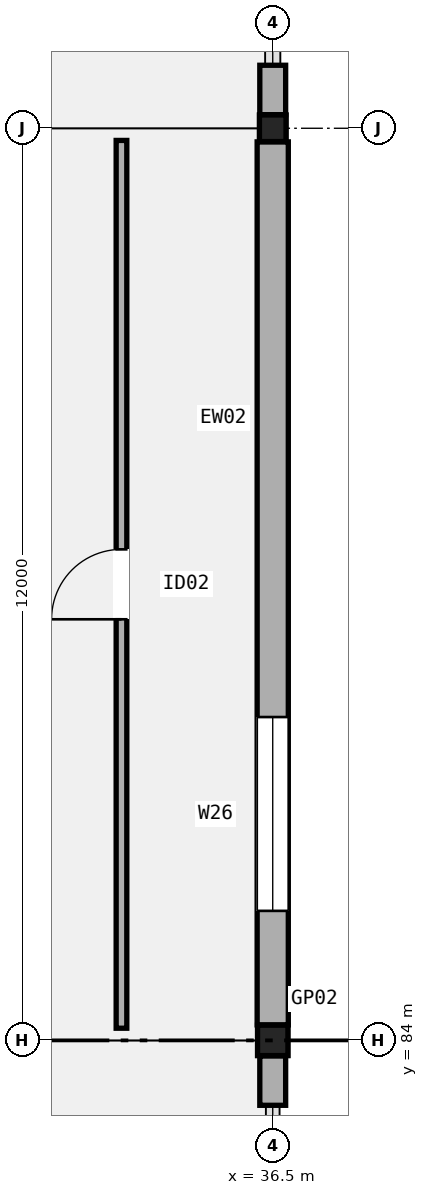
"""IFC4 building model, lengths in metres.
Left out: names, types, materials, properties, quantities, classifications, styles, units other than length and angle.
Written with IfcOpenShell. Run it as: python <this file> out.ifc"""

import sys

from ifc_helpers import new_model, si_unit, direction, frame, frame_2d, origin, origin_2d, place, context, subcontext, project, spatial, rectangle, hollow_rectangle, extrude, element, fill, save


model = new_model("IFC4")
c1 = context("Model", 3, precision=1e-05, world=origin(), true_north=direction((0.0, 1.0)))
c2 = subcontext(c1, "Body", "Model", "MODEL_VIEW")
j1 = project(units=[si_unit("LENGTHUNIT", "METRE"), si_unit("PLANEANGLEUNIT", "RADIAN")], contexts=[c1])
p1 = place(None, origin())
s1 = spatial("IfcSite", under=j1, at=p1, CompositionType="ELEMENT")
p2 = place(p1, origin())
s2 = spatial("IfcBuilding", under=s1, at=p2, CompositionType="ELEMENT")
p3 = place(p2, frame((0.0, 0.0, 15.3)))
s3 = spatial("IfcBuildingStorey", under=s2, at=p3, CompositionType="ELEMENT", Elevation=15.3)
p4 = place(p3, frame((36.5, 84.0, 0.0), z_axis=(0.0, 0.0, 1.0), x_axis=(1.0, 0.0, 0.0)))
e1 = element("IfcColumn", 1, at=p4, inside=s3, PredefinedType="COLUMN", context=c2, shape_type="SweptSolid", body=[
    extrude(hollow_rectangle(XDim=0.4, YDim=0.4, WallThickness=0.016, InnerFilletRadius=0.016, OuterFilletRadius=0.032, at=origin_2d()), origin(), (0.0, 0.0, 1.0), 5.1),
])
p5 = place(p3, frame((36.5, 96.0, 0.0), z_axis=(0.0, 0.0, 1.0), x_axis=(1.0, 0.0, 0.0)))
e2 = element("IfcColumn", 2, at=p5, inside=s3, PredefinedType="COLUMN", context=c2, shape_type="SweptSolid", body=[
    extrude(hollow_rectangle(XDim=0.35, YDim=0.35, WallThickness=0.016, InnerFilletRadius=0.016, OuterFilletRadius=0.032, at=origin_2d()), origin(), (0.0, 0.0, 1.0), 5.1),
])
p6 = place(p3, frame((36.5, 83.146, 0.0), z_axis=(0.0, 0.0, 1.0), x_axis=(0.0, 1.0, 0.0)))
e3 = element("IfcWall", 3, at=p6, inside=s3, PredefinedType="SOLIDWALL", context=c2, shape_type="SweptSolid", body=[
    extrude(rectangle(XDim=0.65, YDim=0.34, at=frame_2d((0.325, 0.0))), origin(), (0.0, 0.0, 1.0), 4.06),
])
p7 = place(p3, frame((36.5, 84.204, 0.0), z_axis=(0.0, 0.0, 1.0), x_axis=(0.0, 1.0, 0.0)))
e4 = element("IfcWall", 4, at=p7, inside=s3, PredefinedType="SOLIDWALL", context=c2, shape_type="SweptSolid", body=[
    extrude(rectangle(XDim=11.617, YDim=0.41, at=frame_2d((5.809, 0.0))), origin(), (0.0, 0.0, 1.0), 4.16),
])
p8 = place(p7, frame((1.5, 0.0, 0.95)))
e5 = element("IfcOpeningElement", 5, at=p8, cuts=e4, PredefinedType="OPENING", context=c2, shape_type="SweptSolid", body=[
    extrude(rectangle(XDim=2.55, YDim=1.95, at=frame_2d((1.275, 0.975))), frame((0.0, 0.215, 0.0), z_axis=(0.0, -1.0, 0.0), x_axis=(1.0, 0.0, 0.0)), (0.0, 0.0, 1.0), 0.43),
])
p9 = place(p3, frame((36.5, 96.179, 0.0), z_axis=(0.0, 0.0, 1.0), x_axis=(0.0, 1.0, 0.0)))
e6 = element("IfcWall", 6, at=p9, inside=s3, PredefinedType="SOLIDWALL", context=c2, shape_type="SweptSolid", body=[
    extrude(rectangle(XDim=0.65, YDim=0.34, at=frame_2d((0.325, 0.0))), origin(), (0.0, 0.0, 1.0), 4.172),
])
p10 = place(p3, frame((34.51, 84.16, 0.0), z_axis=(0.0, 0.0, 1.0), x_axis=(0.0, 1.0, 0.0)))
e7 = element("IfcWall", 7, at=p10, inside=s3, PredefinedType="PARTITIONING", context=c2, shape_type="SweptSolid", body=[
    extrude(rectangle(XDim=11.68, YDim=0.14, at=frame_2d((5.84, 0.0))), origin(), (0.0, 0.0, 1.0), 4.22),
])
p11 = place(p10, frame((5.38, 0.0, 0.0)))
e8 = element("IfcOpeningElement", 8, at=p11, cuts=e7, PredefinedType="OPENING", context=c2, shape_type="SweptSolid", body=[
    extrude(rectangle(XDim=0.92, YDim=2.1, at=frame_2d((0.46, 1.05))), frame((0.0, 0.08, 0.0), z_axis=(0.0, -1.0, 0.0), x_axis=(1.0, 0.0, 0.0)), (0.0, 0.0, 1.0), 0.16),
])
p12 = place(p8, origin())
e9 = element("IfcWindow", 9, at=p12, inside=s3, PartitioningType="SINGLE_PANEL", PredefinedType="WINDOW", context=c2, shape_type="SweptSolid", body=[
    extrude(rectangle(XDim=2.55, YDim=1.95, at=frame_2d((1.275, 0.975))), frame((0.0, 0.03, 0.0), z_axis=(0.0, -1.0, 0.0), x_axis=(1.0, 0.0, 0.0)), (0.0, 0.0, 1.0), 0.06),
])
fill(e5, e9)
p13 = place(p11, origin())
e10 = element("IfcDoor", 10, at=p13, inside=s3, OperationType="SINGLE_SWING_LEFT", PredefinedType="DOOR", context=c2, shape_type="SweptSolid", body=[
    extrude(rectangle(XDim=0.92, YDim=2.1, at=frame_2d((0.46, 1.05))), frame((0.0, 0.025, 0.0), z_axis=(0.0, -1.0, 0.0), x_axis=(1.0, 0.0, 0.0)), (0.0, 0.0, 1.0), 0.05),
])
fill(e8, e10)
save(model, sys.argv[1])
